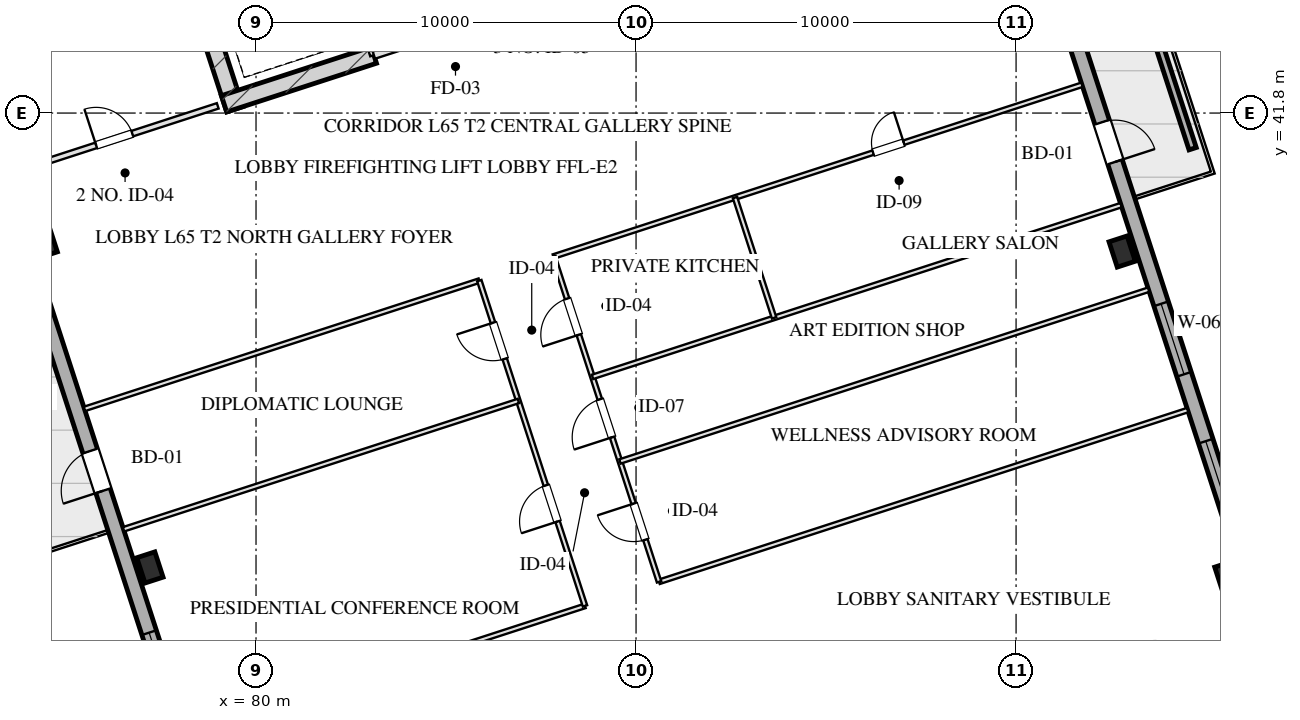
"""IFC4 building model, lengths in metres.
Left out: names, types, materials, properties, quantities, classifications, styles, units other than length and angle.
Written with IfcOpenShell. Run it as: python <this file> out.ifc"""

import sys

from ifc_helpers import new_model, si_unit, direction, frame, frame_2d, origin, origin_2d, place, context, subcontext, project, spatial, rectangle, hollow_rectangle, extrude, element, fill, save


model = new_model("IFC4")
c1 = context("Model", 3, precision=1e-05, world=origin(), true_north=direction((0.0, 1.0)))
c2 = subcontext(c1, "Body", "Model", "MODEL_VIEW")
j1 = project(units=[si_unit("LENGTHUNIT", "METRE"), si_unit("PLANEANGLEUNIT", "RADIAN")], contexts=[c1])
p1 = place(None, origin())
s1 = spatial("IfcSite", under=j1, at=p1, CompositionType="ELEMENT")
p2 = place(p1, origin())
s2 = spatial("IfcBuilding", under=s1, at=p2, CompositionType="ELEMENT")
p3 = place(p2, frame((0.0, 0.0, 240.8)))
s3 = spatial("IfcBuildingStorey", under=s2, at=p3, CompositionType="ELEMENT", Elevation=240.8)
p4 = place(p3, frame((79.442, 41.899, 0.0), z_axis=(0.0, 0.0, 1.0), x_axis=(-0.309035778627, 0.951050412717, 0.0)))
e1 = element("IfcWall", 1, at=p4, inside=s3, PredefinedType="SHEAR", context=c2, shape_type="SweptSolid", body=[
    extrude(rectangle(XDim=9.33, YDim=0.45, at=frame_2d((4.665, 0.0))), origin(), (0.0, 0.0, 1.0), 3.2),
])
p5 = place(p3, frame((79.159, 42.043, 0.0), z_axis=(0.0, 0.0, 1.0), x_axis=(0.951047485828, 0.309044785913, 0.0)))
e2 = element("IfcWall", 2, at=p5, inside=s3, PredefinedType="SHEAR", context=c2, shape_type="SweptSolid", body=[
    extrude(rectangle(XDim=4.145, YDim=0.45, at=frame_2d((2.073, 0.0))), origin(), (0.0, 0.0, 1.0), 3.2),
])
for number, where, z_axis, x_axis in (
    (3, (77.208, 29.844, 0.0), (0.0, 0.0, 1.0), (0.951, 0.309, 0.0)),
    (4, (74.427, 38.403, 0.0), (0.0, 0.0, 1.0), (0.951, 0.309, 0.0)),
    (5, (105.573, 29.597, 0.0), (0.0, 0.0, 1.0), (0.951, 0.309, 0.0)),
    (6, (102.792, 38.156, 0.0), (0.0, 0.0, 1.0), (0.951, 0.309, 0.0)),
):
    element("IfcColumn", number, at=place(p3, frame(where, z_axis=z_axis, x_axis=x_axis)), inside=s3, PredefinedType="COLUMN", context=c2, shape_type="SweptSolid", body=[
        extrude(hollow_rectangle(XDim=0.5, YDim=0.7, WallThickness=0.025, at=origin_2d()), origin(), (0.0, 0.0, 1.0), 3.201),
    ])
p6 = place(p3, frame((82.618, 11.414, 0.0), z_axis=(0.0, 0.0, 1.0), x_axis=(-0.309016491071, 0.951056679828, 0.0)))
e7 = element("IfcWall", 7, at=p6, inside=s3, PredefinedType="SOLIDWALL", context=c2, shape_type="SweptSolid", body=[
    extrude(rectangle(XDim=38.4, YDim=0.4, at=frame_2d((19.2, 0.0))), origin(), (0.0, 0.0, 1.0), 2.36),
])
p7 = place(p6, frame((11.825, 0.0, 0.75)))
e8 = element("IfcOpeningElement", 8, at=p7, cuts=e7, PredefinedType="OPENING", context=c2, shape_type="SweptSolid", body=[
    extrude(rectangle(XDim=1.95, YDim=1.21, at=frame_2d((0.975, 0.605))), frame((0.0, 0.21, 0.0), z_axis=(0.0, -1.0, 0.0), x_axis=(1.0, 0.0, 0.0)), (0.0, 0.0, 1.0), 0.42),
])
p8 = place(p6, frame((15.625, 0.0, 0.75)))
e9 = element("IfcOpeningElement", 9, at=p8, cuts=e7, PredefinedType="OPENING", context=c2, shape_type="SweptSolid", body=[
    extrude(rectangle(XDim=1.95, YDim=1.21, at=frame_2d((0.975, 0.605))), frame((0.0, 0.21, 0.0), z_axis=(0.0, -1.0, 0.0), x_axis=(1.0, 0.0, 0.0)), (0.0, 0.0, 1.0), 0.42),
])
p9 = place(p6, frame((21.5, 0.0, 0.0)))
e10 = element("IfcOpeningElement", 10, at=p9, cuts=e7, PredefinedType="OPENING", context=c2, shape_type="SweptSolid", body=[
    extrude(rectangle(XDim=1.1, YDim=2.15, at=frame_2d((0.55, 1.075))), frame((0.0, 0.21, 0.0), z_axis=(0.0, -1.0, 0.0), x_axis=(1.0, 0.0, 0.0)), (0.0, 0.0, 1.0), 0.42),
])
p10 = place(p3, frame((97.382, 56.586, 0.0), z_axis=(0.0, 0.0, 1.0), x_axis=(0.309016491071, -0.951056679828, 0.0)))
e11 = element("IfcWall", 11, at=p10, inside=s3, PredefinedType="SOLIDWALL", context=c2, shape_type="SweptSolid", body=[
    extrude(rectangle(XDim=38.4, YDim=0.4, at=frame_2d((19.2, 0.0))), origin(), (0.0, 0.0, 1.0), 2.36),
])
p11 = place(p10, frame((24.625, 0.0, 0.75)))
e12 = element("IfcOpeningElement", 12, at=p11, cuts=e11, PredefinedType="OPENING", context=c2, shape_type="SweptSolid", body=[
    extrude(rectangle(XDim=1.95, YDim=1.21, at=frame_2d((0.975, 0.605))), frame((0.0, 0.21, 0.0), z_axis=(0.0, -1.0, 0.0), x_axis=(1.0, 0.0, 0.0)), (0.0, 0.0, 1.0), 0.42),
])
p12 = place(p10, frame((20.825, 0.0, 0.75)))
e13 = element("IfcOpeningElement", 13, at=p12, cuts=e11, PredefinedType="OPENING", context=c2, shape_type="SweptSolid", body=[
    extrude(rectangle(XDim=1.95, YDim=1.21, at=frame_2d((0.975, 0.605))), frame((0.0, 0.21, 0.0), z_axis=(0.0, -1.0, 0.0), x_axis=(1.0, 0.0, 0.0)), (0.0, 0.0, 1.0), 0.42),
])
p13 = place(p10, frame((15.8, 0.0, 0.0)))
e14 = element("IfcOpeningElement", 14, at=p13, cuts=e11, PredefinedType="OPENING", context=c2, shape_type="SweptSolid", body=[
    extrude(rectangle(XDim=1.1, YDim=2.15, at=frame_2d((0.55, 1.075))), frame((0.0, 0.21, 0.0), z_axis=(0.0, -1.0, 0.0), x_axis=(1.0, 0.0, 0.0)), (0.0, 0.0, 1.0), 0.42),
])
p14 = place(p3, frame((104.646, 40.862, 0.0), z_axis=(0.0, 0.0, 1.0), x_axis=(-0.309032019345, 0.951051634255, 0.0)))
e15 = element("IfcWall", 15, at=p14, inside=s3, PredefinedType="PARAPET", context=c2, shape_type="SweptSolid", body=[
    extrude(rectangle(XDim=4.8, YDim=0.2, at=frame_2d((2.4, 0.0))), origin(), (0.0, 0.0, 1.0), 0.75),
])
p15 = place(p3, frame((83.101, 43.324, 0.0), z_axis=(0.0, 0.0, 1.0), x_axis=(-0.309048298632, 0.951046344356, 0.0)))
e16 = element("IfcWall", 16, at=p15, inside=s3, PredefinedType="PARTITIONING", context=c2, shape_type="SweptSolid", body=[
    extrude(rectangle(XDim=1.9, YDim=0.2, at=frame_2d((0.95, 0.0))), origin(), (0.0, 0.0, 1.0), 2.925),
])
p16 = place(p15, frame((0.52, 0.0, 0.0)))
e17 = element("IfcOpeningElement", 17, at=p16, cuts=e16, PredefinedType="OPENING", context=c2, shape_type="SweptSolid", body=[
    extrude(rectangle(XDim=1.1, YDim=2.05, at=frame_2d((0.55, 1.025))), frame((0.0, 0.11, 0.0), z_axis=(0.0, -1.0, 0.0), x_axis=(1.0, 0.0, 0.0)), (0.0, 0.0, 1.0), 0.22),
])
p17 = place(p3, frame((83.101, 43.324, 0.0), z_axis=(0.0, 0.0, 1.0), x_axis=(0.951052804469, 0.309028417967, 0.0)))
e18 = element("IfcWall", 18, at=p17, inside=s3, PredefinedType="PARTITIONING", context=c2, shape_type="SweptSolid", body=[
    extrude(rectangle(XDim=3.83, YDim=0.2, at=frame_2d((1.915, 0.0))), origin(), (0.0, 0.0, 1.0), 2.925),
])
p18 = place(p17, frame((1.35, 0.0, 0.0)))
e19 = element("IfcOpeningElement", 19, at=p18, cuts=e18, PredefinedType="OPENING", context=c2, shape_type="SweptSolid", body=[
    extrude(rectangle(XDim=1.2, YDim=2.05, at=frame_2d((0.6, 1.025))), frame((0.0, 0.11, 0.0), z_axis=(0.0, -1.0, 0.0), x_axis=(1.0, 0.0, 0.0)), (0.0, 0.0, 1.0), 0.22),
])
p19 = place(p3, frame((73.476, 40.197, 0.0), z_axis=(0.0, 0.0, 1.0), x_axis=(0.951059431056, 0.309008023519, 0.0)))
e20 = element("IfcWall", 20, at=p19, inside=s3, PredefinedType="PARTITIONING", context=c2, shape_type="SweptSolid", body=[
    extrude(rectangle(XDim=5.8, YDim=0.15, at=frame_2d((2.9, 0.0))), origin(), (0.0, 0.0, 1.0), 2.925),
])
p20 = place(p19, frame((2.436, 0.0, 0.0)))
e21 = element("IfcOpeningElement", 21, at=p20, cuts=e20, PredefinedType="OPENING", context=c2, shape_type="SweptSolid", body=[
    extrude(rectangle(XDim=1.0, YDim=2.05, at=frame_2d((0.5, 1.025))), frame((0.0, 0.085, 0.0), z_axis=(0.0, -1.0, 0.0), x_axis=(1.0, 0.0, 0.0)), (0.0, 0.0, 1.0), 0.17),
])
p21 = place(p3, frame((78.266, 25.456, 0.0), z_axis=(0.0, 0.0, 1.0), x_axis=(0.951056072529, 0.309018360142, 0.0)))
e22 = element("IfcWall", 22, at=p21, inside=s3, PredefinedType="PARTITIONING", context=c2, shape_type="SweptSolid", body=[
    extrude(rectangle(XDim=10.925, YDim=0.12, at=frame_2d((5.462, 0.0))), origin(), (0.0, 0.0, 1.0), 2.925),
])
p22 = place(p3, frame((90.606, 29.465, 0.0), z_axis=(0.0, 0.0, 1.0), x_axis=(0.951058110432, 0.309012088082, 0.0)))
e23 = element("IfcWall", 23, at=p22, inside=s3, PredefinedType="PARTITIONING", context=c2, shape_type="SweptSolid", body=[
    extrude(rectangle(XDim=14.625, YDim=0.12, at=frame_2d((7.312, 0.0))), origin(), (0.0, 0.0, 1.0), 2.925),
])
p23 = place(p3, frame((75.485, 34.015, 0.0), z_axis=(0.0, 0.0, 1.0), x_axis=(0.951058206457, 0.309011792544, 0.0)))
e24 = element("IfcWall", 24, at=p23, inside=s3, PredefinedType="PARTITIONING", context=c2, shape_type="SweptSolid", body=[
    extrude(rectangle(XDim=10.925, YDim=0.12, at=frame_2d((5.462, 0.0))), origin(), (0.0, 0.0, 1.0), 2.925),
])
p24 = place(p3, frame((87.825, 38.025, 0.0), z_axis=(0.0, 0.0, 1.0), x_axis=(0.951058110432, 0.309012088082, 0.0)))
e25 = element("IfcWall", 25, at=p24, inside=s3, PredefinedType="PARTITIONING", context=c2, shape_type="SweptSolid", body=[
    extrude(rectangle(XDim=14.625, YDim=0.12, at=frame_2d((7.312, 0.0))), origin(), (0.0, 0.0, 1.0), 2.925),
])
p25 = place(p24, frame((8.845, 0.0, 0.0)))
e26 = element("IfcOpeningElement", 26, at=p25, cuts=e25, PredefinedType="OPENING", context=c2, shape_type="SweptSolid", body=[
    extrude(rectangle(XDim=0.85, YDim=2.05, at=frame_2d((0.425, 1.025))), frame((0.0, 0.07, 0.0), z_axis=(0.0, -1.0, 0.0), x_axis=(1.0, 0.0, 0.0)), (0.0, 0.0, 1.0), 0.14),
])
p26 = place(p3, frame((88.656, 28.832, 0.0), z_axis=(0.0, 0.0, 1.0), x_axis=(-0.309000197986, 0.951061973609, 0.0)))
e27 = element("IfcWall", 27, at=p26, inside=s3, PredefinedType="PARTITIONING", context=c2, shape_type="SweptSolid", body=[
    extrude(rectangle(XDim=9.0, YDim=0.12, at=frame_2d((4.5, 0.0))), origin(), (0.0, 0.0, 1.0), 2.925),
])
p27 = place(p26, frame((2.335, 0.0, 0.0)))
e28 = element("IfcOpeningElement", 28, at=p27, cuts=e27, PredefinedType="OPENING", context=c2, shape_type="SweptSolid", body=[
    extrude(rectangle(XDim=1.0, YDim=2.05, at=frame_2d((0.5, 1.025))), frame((0.0, 0.07, 0.0), z_axis=(0.0, -1.0, 0.0), x_axis=(1.0, 0.0, 0.0)), (0.0, 0.0, 1.0), 0.14),
])
p28 = place(p26, frame((6.835, 0.0, 0.0)))
e29 = element("IfcOpeningElement", 29, at=p28, cuts=e27, PredefinedType="OPENING", context=c2, shape_type="SweptSolid", body=[
    extrude(rectangle(XDim=1.0, YDim=2.05, at=frame_2d((0.5, 1.025))), frame((0.0, 0.07, 0.0), z_axis=(0.0, -1.0, 0.0), x_axis=(1.0, 0.0, 0.0)), (0.0, 0.0, 1.0), 0.14),
])
p29 = place(p3, frame((90.606, 29.465, 0.0), z_axis=(0.0, 0.0, 1.0), x_axis=(-0.309024734286, 0.951054001411, 0.0)))
e30 = element("IfcWall", 30, at=p29, inside=s3, PredefinedType="PARTITIONING", context=c2, shape_type="SweptSolid", body=[
    extrude(rectangle(XDim=9.0, YDim=0.12, at=frame_2d((4.5, 0.0))), origin(), (0.0, 0.0, 1.0), 2.925),
])
p30 = place(p29, frame((1.165, 0.0, 0.0)))
e31 = element("IfcOpeningElement", 31, at=p30, cuts=e30, PredefinedType="OPENING", context=c2, shape_type="SweptSolid", body=[
    extrude(rectangle(XDim=1.0, YDim=2.05, at=frame_2d((0.5, 1.025))), frame((0.0, 0.07, 0.0), z_axis=(0.0, -1.0, 0.0), x_axis=(1.0, 0.0, 0.0)), (0.0, 0.0, 1.0), 0.14),
])
p31 = place(p29, frame((4.0, 0.0, 0.0)))
e32 = element("IfcOpeningElement", 32, at=p31, cuts=e30, PredefinedType="OPENING", context=c2, shape_type="SweptSolid", body=[
    extrude(rectangle(XDim=1.05, YDim=2.05, at=frame_2d((0.525, 1.025))), frame((0.0, 0.07, 0.0), z_axis=(0.0, -1.0, 0.0), x_axis=(1.0, 0.0, 0.0)), (0.0, 0.0, 1.0), 0.14),
])
p32 = place(p29, frame((6.835, 0.0, 0.0)))
e33 = element("IfcOpeningElement", 33, at=p32, cuts=e30, PredefinedType="OPENING", context=c2, shape_type="SweptSolid", body=[
    extrude(rectangle(XDim=1.0, YDim=2.05, at=frame_2d((0.5, 1.025))), frame((0.0, 0.07, 0.0), z_axis=(0.0, -1.0, 0.0), x_axis=(1.0, 0.0, 0.0)), (0.0, 0.0, 1.0), 0.14),
])
p33 = place(p3, frame((76.514, 30.848, 0.0), z_axis=(0.0, 0.0, 1.0), x_axis=(0.951056072529, 0.309018360142, 0.0)))
e34 = element("IfcWall", 34, at=p33, inside=s3, PredefinedType="PARTITIONING", context=c2, shape_type="SweptSolid", body=[
    extrude(rectangle(XDim=10.925, YDim=0.12, at=frame_2d((5.462, 0.0))), origin(), (0.0, 0.0, 1.0), 2.925),
])
for number, where, z_axis, x_axis in (
    (35, (89.577, 32.632, 0.0), (0.0, 0.0, 1.0), (0.951, 0.309, 0.0)),
    (36, (88.854, 34.858, 0.0), (0.0, 0.0, 1.0), (0.951, 0.309, 0.0)),
):
    element("IfcWall", number, at=place(p3, frame(where, z_axis=z_axis, x_axis=x_axis)), inside=s3, PredefinedType="PARTITIONING", context=c2, shape_type="SweptSolid", body=[
        extrude(rectangle(XDim=14.625, YDim=0.12, at=frame_2d((7.312, 0.0))), origin(), (0.0, 0.0, 1.0), 2.925),
    ])
p34 = place(p3, frame((93.633, 36.411, 0.0), z_axis=(0.0, 0.0, 1.0), x_axis=(-0.309026391202, 0.95105346303, 0.0)))
e37 = element("IfcWall", 37, at=p34, inside=s3, PredefinedType="PARTITIONING", context=c2, shape_type="SweptSolid", body=[
    extrude(rectangle(XDim=3.33, YDim=0.12, at=frame_2d((1.665, 0.0))), origin(), (0.0, 0.0, 1.0), 2.925),
])
p35 = place(p8, origin())
e38 = element("IfcWindow", 38, at=p35, inside=s3, PartitioningType="TRIPLE_PANEL_VERTICAL", PredefinedType="WINDOW", context=c2, shape_type="SweptSolid", body=[
    extrude(rectangle(XDim=1.95, YDim=1.21, at=frame_2d((0.975, 0.605))), frame((0.0, 0.03, 0.0), z_axis=(0.0, -1.0, 0.0), x_axis=(1.0, 0.0, 0.0)), (0.0, 0.0, 1.0), 0.06),
])
fill(e9, e38)
p36 = place(p11, origin())
e39 = element("IfcWindow", 39, at=p36, inside=s3, PartitioningType="TRIPLE_PANEL_VERTICAL", PredefinedType="WINDOW", context=c2, shape_type="SweptSolid", body=[
    extrude(rectangle(XDim=1.95, YDim=1.21, at=frame_2d((0.975, 0.605))), frame((0.0, 0.03, 0.0), z_axis=(0.0, -1.0, 0.0), x_axis=(1.0, 0.0, 0.0)), (0.0, 0.0, 1.0), 0.06),
])
fill(e12, e39)
p37 = place(p12, origin())
e40 = element("IfcWindow", 40, at=p37, inside=s3, PartitioningType="TRIPLE_PANEL_VERTICAL", PredefinedType="WINDOW", context=c2, shape_type="SweptSolid", body=[
    extrude(rectangle(XDim=1.95, YDim=1.21, at=frame_2d((0.975, 0.605))), frame((0.0, 0.03, 0.0), z_axis=(0.0, -1.0, 0.0), x_axis=(1.0, 0.0, 0.0)), (0.0, 0.0, 1.0), 0.06),
])
fill(e13, e40)
p38 = place(p9, origin())
e41 = element("IfcDoor", 41, at=p38, inside=s3, OperationType="SINGLE_SWING_LEFT", PredefinedType="DOOR", context=c2, shape_type="SweptSolid", body=[
    extrude(rectangle(XDim=1.1, YDim=2.15, at=frame_2d((0.55, 1.075))), frame((0.0, 0.025, 0.0), z_axis=(0.0, -1.0, 0.0), x_axis=(1.0, 0.0, 0.0)), (0.0, 0.0, 1.0), 0.05),
])
fill(e10, e41)
p39 = place(p13, origin())
e42 = element("IfcDoor", 42, at=p39, inside=s3, OperationType="SINGLE_SWING_RIGHT", PredefinedType="DOOR", context=c2, shape_type="SweptSolid", body=[
    extrude(rectangle(XDim=1.1, YDim=2.15, at=frame_2d((0.55, 1.075))), frame((0.0, 0.025, 0.0), z_axis=(0.0, -1.0, 0.0), x_axis=(1.0, 0.0, 0.0)), (0.0, 0.0, 1.0), 0.05),
])
fill(e14, e42)
p40 = place(p20, origin())
e43 = element("IfcDoor", 43, at=p40, inside=s3, OperationType="SINGLE_SWING_LEFT", PredefinedType="DOOR", context=c2, shape_type="SweptSolid", body=[
    extrude(rectangle(XDim=1.0, YDim=2.05, at=frame_2d((0.5, 1.025))), frame((0.0, 0.025, 0.0), z_axis=(0.0, -1.0, 0.0), x_axis=(1.0, 0.0, 0.0)), (0.0, 0.0, 1.0), 0.05),
])
fill(e21, e43)
p41 = place(p25, origin())
e44 = element("IfcDoor", 44, at=p41, inside=s3, OperationType="SINGLE_SWING_RIGHT", PredefinedType="DOOR", context=c2, shape_type="SweptSolid", body=[
    extrude(rectangle(XDim=0.85, YDim=2.05, at=frame_2d((0.425, 1.025))), frame((0.0, 0.025, 0.0), z_axis=(0.0, -1.0, 0.0), x_axis=(1.0, 0.0, 0.0)), (0.0, 0.0, 1.0), 0.05),
])
fill(e26, e44)
p42 = place(p27, origin())
e45 = element("IfcDoor", 45, at=p42, inside=s3, OperationType="SINGLE_SWING_LEFT", PredefinedType="DOOR", context=c2, shape_type="SweptSolid", body=[
    extrude(rectangle(XDim=1.0, YDim=2.05, at=frame_2d((0.5, 1.025))), frame((0.0, 0.025, 0.0), z_axis=(0.0, -1.0, 0.0), x_axis=(1.0, 0.0, 0.0)), (0.0, 0.0, 1.0), 0.05),
])
fill(e28, e45)
p43 = place(p28, origin())
e46 = element("IfcDoor", 46, at=p43, inside=s3, OperationType="SINGLE_SWING_RIGHT", PredefinedType="DOOR", context=c2, shape_type="SweptSolid", body=[
    extrude(rectangle(XDim=1.0, YDim=2.05, at=frame_2d((0.5, 1.025))), frame((0.0, 0.025, 0.0), z_axis=(0.0, -1.0, 0.0), x_axis=(1.0, 0.0, 0.0)), (0.0, 0.0, 1.0), 0.05),
])
fill(e29, e46)
p44 = place(p30, origin())
e47 = element("IfcDoor", 47, at=p44, inside=s3, OperationType="SINGLE_SWING_RIGHT", PredefinedType="DOOR", context=c2, shape_type="SweptSolid", body=[
    extrude(rectangle(XDim=1.0, YDim=2.05, at=frame_2d((0.5, 1.025))), frame((0.0, 0.025, 0.0), z_axis=(0.0, -1.0, 0.0), x_axis=(1.0, 0.0, 0.0)), (0.0, 0.0, 1.0), 0.05),
])
fill(e31, e47)
p45 = place(p31, origin())
e48 = element("IfcDoor", 48, at=p45, inside=s3, OperationType="SINGLE_SWING_LEFT", PredefinedType="DOOR", context=c2, shape_type="SweptSolid", body=[
    extrude(rectangle(XDim=1.05, YDim=2.05, at=frame_2d((0.525, 1.025))), frame((0.0, 0.025, 0.0), z_axis=(0.0, -1.0, 0.0), x_axis=(1.0, 0.0, 0.0)), (0.0, 0.0, 1.0), 0.05),
])
fill(e32, e48)
p46 = place(p32, origin())
e49 = element("IfcDoor", 49, at=p46, inside=s3, OperationType="SINGLE_SWING_LEFT", PredefinedType="DOOR", context=c2, shape_type="SweptSolid", body=[
    extrude(rectangle(XDim=1.0, YDim=2.05, at=frame_2d((0.5, 1.025))), frame((0.0, 0.025, 0.0), z_axis=(0.0, -1.0, 0.0), x_axis=(1.0, 0.0, 0.0)), (0.0, 0.0, 1.0), 0.05),
])
fill(e33, e49)
save(model, sys.argv[1])
